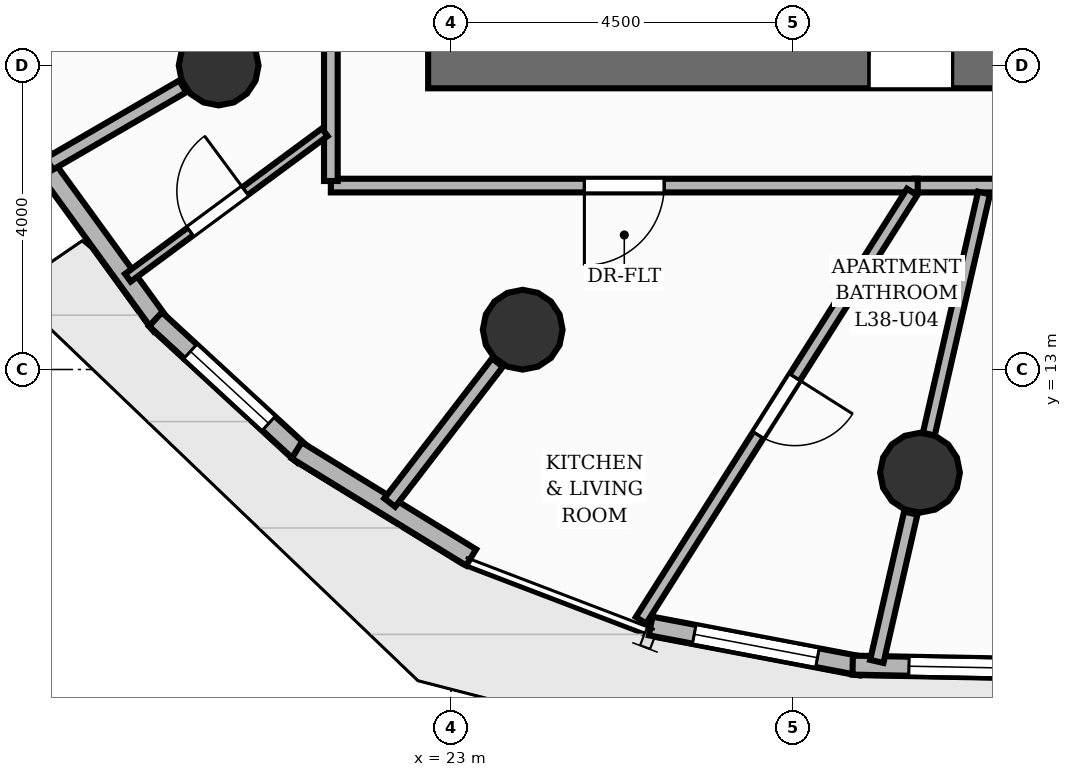
"""IFC4 building model, lengths in metres.
Left out: names, types, materials, properties, quantities, classifications, styles, units other than length and angle.
Written with IfcOpenShell. Run it as: python <this file> out.ifc"""

import sys

from ifc_helpers import new_model, si_unit, direction, frame, frame_2d, origin, origin_2d, place, context, subcontext, project, spatial, rectangle, circle, extrude, element, fill, save


model = new_model("IFC4")
c1 = context("Model", 3, precision=1e-05, world=origin(), true_north=direction((0.0, 1.0)))
c2 = subcontext(c1, "Body", "Model", "MODEL_VIEW")
j1 = project(units=[si_unit("LENGTHUNIT", "METRE"), si_unit("PLANEANGLEUNIT", "RADIAN")], contexts=[c1])
p1 = place(None, origin())
s1 = spatial("IfcSite", under=j1, at=p1, CompositionType="ELEMENT")
p2 = place(p1, origin())
s2 = spatial("IfcBuilding", under=s1, at=p2, CompositionType="ELEMENT")
p3 = place(p2, frame((0.0, 0.0, 129.76)))
s3 = spatial("IfcBuildingStorey", under=s2, at=p3, CompositionType="ELEMENT", Elevation=129.76)
p4 = place(p3, frame((22.7, 17.0, 0.0), z_axis=(0.0, 0.0, 1.0), x_axis=(1.0, 0.0, 0.0)))
e1 = element("IfcWall", 1, at=p4, inside=s3, PredefinedType="SHEAR", context=c2, shape_type="SweptSolid", body=[
    extrude(rectangle(XDim=15.1, YDim=0.6, at=frame_2d((7.55, 0.0))), origin(), (0.0, 0.0, 1.0), 3.2),
])
p5 = place(p4, frame((5.8, 0.0, 0.0)))
e2 = element("IfcOpeningElement", 2, at=p5, cuts=e1, PredefinedType="OPENING", context=c2, shape_type="SweptSolid", body=[
    extrude(rectangle(XDim=1.1, YDim=2.15, at=frame_2d((0.55, 1.075))), frame((0.0, 0.31, 0.0), z_axis=(0.0, -1.0, 0.0), x_axis=(1.0, 0.0, 0.0)), (0.0, 0.0, 1.0), 0.62),
])
p6 = place(p4, frame((9.35, 0.0, 0.0)))
e3 = element("IfcOpeningElement", 3, at=p6, cuts=e1, PredefinedType="OPENING", context=c2, shape_type="SweptSolid", body=[
    extrude(rectangle(XDim=0.9, YDim=2.1, at=frame_2d((0.45, 1.05))), frame((0.0, 0.31, 0.0), z_axis=(0.0, -1.0, 0.0), x_axis=(1.0, 0.0, 0.0)), (0.0, 0.0, 1.0), 0.62),
])
for number, where, z_axis, x_axis in (
    (4, (19.944, 17.0, 0.0), (0.0, 0.0, 1.0), (1.0, 0.0, 0.0)),
    (5, (23.944, 13.523, 0.0), (0.0, 0.0, 1.0), (1.0, 0.0, 0.0)),
    (6, (29.171, 11.642, 0.0), (0.0, 0.0, 1.0), (1.0, 0.0, 0.0)),
):
    element("IfcColumn", number, at=place(p3, frame(where, z_axis=z_axis, x_axis=x_axis)), inside=s3, PredefinedType="COLUMN", context=c2, shape_type="SweptSolid", body=[
        extrude(circle(Radius=0.525, at=origin_2d()), origin(), (0.0, 0.0, 1.0), 3.2),
    ])
p7 = place(p3, frame((17.705, 15.6, 0.0), z_axis=(0.0, 0.0, 1.0), x_axis=(-0.41458087789, 0.910012470073, 0.0)))
e7 = element("IfcWall", 7, at=p7, inside=s3, PredefinedType="SOLIDWALL", context=c2, shape_type="SweptSolid", body=[
    extrude(rectangle(XDim=2.624, YDim=0.25, at=frame_2d((1.312, 0.0))), origin(), (0.0, 0.0, 1.0), 2.96),
])
p8 = place(p7, frame((0.612, 0.0, 0.85)))
e8 = element("IfcOpeningElement", 8, at=p8, cuts=e7, PredefinedType="OPENING", context=c2, shape_type="SweptSolid", body=[
    extrude(rectangle(XDim=1.4, YDim=1.55, at=frame_2d((0.7, 0.775))), frame((0.0, 0.135, 0.0), z_axis=(0.0, -1.0, 0.0), x_axis=(1.0, 0.0, 0.0)), (0.0, 0.0, 1.0), 0.27),
])
p9 = place(p3, frame((19.189, 13.576, 0.0), z_axis=(0.0, 0.0, 1.0), x_axis=(-0.587574137145, 0.80917033643, 0.0)))
e9 = element("IfcWall", 9, at=p9, inside=s3, PredefinedType="SOLIDWALL", context=c2, shape_type="SweptSolid", body=[
    extrude(rectangle(XDim=2.624, YDim=0.25, at=frame_2d((1.312, 0.0))), origin(), (0.0, 0.0, 1.0), 2.96),
])
p10 = place(p3, frame((21.061, 11.868, 0.0), z_axis=(0.0, 0.0, 1.0), x_axis=(-0.73572884951, 0.677276206579, 0.0)))
e10 = element("IfcWall", 10, at=p10, inside=s3, PredefinedType="SOLIDWALL", context=c2, shape_type="SweptSolid", body=[
    extrude(rectangle(XDim=2.648, YDim=0.25, at=frame_2d((1.324, 0.0))), origin(), (0.0, 0.0, 1.0), 2.96),
])
p11 = place(p10, frame((0.624, 0.0, 0.85)))
e11 = element("IfcOpeningElement", 11, at=p11, cuts=e10, PredefinedType="OPENING", context=c2, shape_type="SweptSolid", body=[
    extrude(rectangle(XDim=1.4, YDim=1.55, at=frame_2d((0.7, 0.775))), frame((0.0, 0.135, 0.0), z_axis=(0.0, -1.0, 0.0), x_axis=(1.0, 0.0, 0.0)), (0.0, 0.0, 1.0), 0.27),
])
p12 = place(p3, frame((23.265, 10.527, 0.0), z_axis=(0.0, 0.0, 1.0), x_axis=(-0.852103133134, 0.523373910797, 0.0)))
e12 = element("IfcWall", 12, at=p12, inside=s3, PredefinedType="SOLIDWALL", context=c2, shape_type="SweptSolid", body=[
    extrude(rectangle(XDim=2.693, YDim=0.25, at=frame_2d((1.346, 0.0))), origin(), (0.0, 0.0, 1.0), 2.96),
])
p13 = place(p3, frame((28.396, 9.099, 0.0), z_axis=(0.0, 0.0, 1.0), x_axis=(-0.982412055756, 0.18672587583, 0.0)))
e13 = element("IfcWall", 13, at=p13, inside=s3, PredefinedType="SOLIDWALL", context=c2, shape_type="SweptSolid", body=[
    extrude(rectangle(XDim=2.818, YDim=0.25, at=frame_2d((1.409, 0.0))), origin(), (0.0, 0.0, 1.0), 2.96),
])
p14 = place(p13, frame((0.584, 0.0, 0.85)))
e14 = element("IfcOpeningElement", 14, at=p14, cuts=e13, PredefinedType="OPENING", context=c2, shape_type="SweptSolid", body=[
    extrude(rectangle(XDim=1.65, YDim=1.55, at=frame_2d((0.825, 0.775))), frame((0.0, 0.135, 0.0), z_axis=(0.0, -1.0, 0.0), x_axis=(1.0, 0.0, 0.0)), (0.0, 0.0, 1.0), 0.27),
])
p15 = place(p3, frame((31.167, 9.055, 0.0), z_axis=(0.0, 0.0, 1.0), x_axis=(-0.99981990109, 0.018978023714, 0.0)))
e15 = element("IfcWall", 15, at=p15, inside=s3, PredefinedType="SOLIDWALL", context=c2, shape_type="SweptSolid", body=[
    extrude(rectangle(XDim=2.882, YDim=0.25, at=frame_2d((1.441, 0.0))), origin(), (0.0, 0.0, 1.0), 2.96),
])
p16 = place(p15, frame((0.741, 0.0, 0.85)))
e16 = element("IfcOpeningElement", 16, at=p16, cuts=e15, PredefinedType="OPENING", context=c2, shape_type="SweptSolid", body=[
    extrude(rectangle(XDim=1.4, YDim=1.55, at=frame_2d((0.7, 0.775))), frame((0.0, 0.135, 0.0), z_axis=(0.0, -1.0, 0.0), x_axis=(1.0, 0.0, 0.0)), (0.0, 0.0, 1.0), 0.27),
])
p17 = place(p3, frame((19.472, 16.726, 0.0), z_axis=(0.0, 0.0, 1.0), x_axis=(-0.86481084581, -0.502097800203, 0.0)))
e17 = element("IfcWall", 17, at=p17, inside=s3, PredefinedType="PARTITIONING", context=c2, shape_type="SweptSolid", body=[
    extrude(rectangle(XDim=2.03, YDim=0.18, at=frame_2d((1.015, 0.0))), origin(), (0.0, 0.0, 1.0), 2.336),
])
p18 = place(p3, frame((23.612, 13.092, 0.0), z_axis=(0.0, 0.0, 1.0), x_axis=(-0.609553382458, -0.792745024541, 0.0)))
e18 = element("IfcWall", 18, at=p18, inside=s3, PredefinedType="PARTITIONING", context=c2, shape_type="SweptSolid", body=[
    extrude(rectangle(XDim=2.324, YDim=0.18, at=frame_2d((1.162, 0.0))), origin(), (0.0, 0.0, 1.0), 2.336),
])
p19 = place(p3, frame((29.05, 11.111, 0.0), z_axis=(0.0, 0.0, 1.0), x_axis=(-0.2231492674, -0.974784286116, 0.0)))
e19 = element("IfcWall", 19, at=p19, inside=s3, PredefinedType="PARTITIONING", context=c2, shape_type="SweptSolid", body=[
    extrude(rectangle(XDim=2.002, YDim=0.18, at=frame_2d((1.001, 0.0))), origin(), (0.0, 0.0, 1.0), 2.336),
])
p20 = place(p3, frame((39.02, 15.42, 0.0), z_axis=(0.0, 0.0, 1.0), x_axis=(-1.0, 0.0, 0.0)))
e20 = element("IfcWall", 20, at=p20, inside=s3, PredefinedType="PARTITIONING", context=c2, shape_type="SweptSolid", body=[
    extrude(rectangle(XDim=9.922, YDim=0.18, at=frame_2d((4.961, 0.0))), origin(), (0.0, 0.0, 1.0), 2.955),
])
p21 = place(p20, frame((3.487, 0.0, 0.0)))
e21 = element("IfcOpeningElement", 21, at=p21, cuts=e20, PredefinedType="OPENING", context=c2, shape_type="SweptSolid", body=[
    extrude(rectangle(XDim=0.9, YDim=2.1, at=frame_2d((0.45, 1.05))), frame((0.0, 0.1, 0.0), z_axis=(0.0, -1.0, 0.0), x_axis=(1.0, 0.0, 0.0)), (0.0, 0.0, 1.0), 0.2),
])
p22 = place(p20, frame((6.571, 0.0, 0.0)))
e22 = element("IfcOpeningElement", 22, at=p22, cuts=e20, PredefinedType="OPENING", context=c2, shape_type="SweptSolid", body=[
    extrude(rectangle(XDim=0.9, YDim=2.1, at=frame_2d((0.45, 1.05))), frame((0.0, 0.1, 0.0), z_axis=(0.0, -1.0, 0.0), x_axis=(1.0, 0.0, 0.0)), (0.0, 0.0, 1.0), 0.2),
])
p23 = place(p3, frame((29.141, 15.42, 0.0), z_axis=(0.0, 0.0, 1.0), x_axis=(-1.0, 0.0, 0.0)))
e23 = element("IfcWall", 23, at=p23, inside=s3, PredefinedType="PARTITIONING", context=c2, shape_type="SweptSolid", body=[
    extrude(rectangle(XDim=7.721, YDim=0.18, at=frame_2d((3.861, 0.0))), origin(), (0.0, 0.0, 1.0), 2.955),
])
p24 = place(p23, frame((3.336, 0.0, 0.0)))
e24 = element("IfcOpeningElement", 24, at=p24, cuts=e23, PredefinedType="OPENING", context=c2, shape_type="SweptSolid", body=[
    extrude(rectangle(XDim=1.05, YDim=2.15, at=frame_2d((0.525, 1.075))), frame((0.0, 0.1, 0.0), z_axis=(0.0, -1.0, 0.0), x_axis=(1.0, 0.0, 0.0)), (0.0, 0.0, 1.0), 0.2),
])
p25 = place(p3, frame((21.42, 15.48, 0.0), z_axis=(0.0, 0.0, 1.0), x_axis=(0.0, 1.0, 0.0)))
e25 = element("IfcWall", 25, at=p25, inside=s3, PredefinedType="PARTITIONING", context=c2, shape_type="SweptSolid", body=[
    extrude(rectangle(XDim=6.12, YDim=0.18, at=frame_2d((3.06, 0.0))), origin(), (0.0, 0.0, 1.0), 2.955),
])
p26 = place(p3, frame((29.287, 12.149, 0.0), z_axis=(0.0, 0.0, 1.0), x_axis=(0.223166862669, 0.97478025801, 0.0)))
e26 = element("IfcWall", 26, at=p26, inside=s3, PredefinedType="PLUMBINGWALL", context=c2, shape_type="SweptSolid", body=[
    extrude(rectangle(XDim=3.256, YDim=0.16, at=frame_2d((1.628, 0.0))), origin(), (0.0, 0.0, 1.0), 2.336),
])
p27 = place(p3, frame((29.068, 15.335, 0.0), z_axis=(0.0, 0.0, 1.0), x_axis=(-0.534879638081, -0.844928264864, 0.0)))
e27 = element("IfcWall", 27, at=p27, inside=s3, PredefinedType="PLUMBINGWALL", context=c2, shape_type="SweptSolid", body=[
    extrude(rectangle(XDim=6.669, YDim=0.16, at=frame_2d((3.335, 0.0))), origin(), (0.0, 0.0, 1.0), 2.692),
])
p28 = place(p27, frame((2.885, 0.0, 0.0)))
e28 = element("IfcOpeningElement", 28, at=p28, cuts=e27, PredefinedType="OPENING", context=c2, shape_type="SweptSolid", body=[
    extrude(rectangle(XDim=0.9, YDim=2.1, at=frame_2d((0.45, 1.05))), frame((0.0, 0.09, 0.0), z_axis=(0.0, -1.0, 0.0), x_axis=(1.0, 0.0, 0.0)), (0.0, 0.0, 1.0), 0.18),
])
p29 = place(p3, frame((18.749, 14.207, 0.0), z_axis=(0.0, 0.0, 1.0), x_axis=(0.804182442208, 0.594382536456, 0.0)))
e29 = element("IfcWall", 29, at=p29, inside=s3, PredefinedType="PARTITIONING", context=c2, shape_type="SweptSolid", body=[
    extrude(rectangle(XDim=3.221, YDim=0.125, at=frame_2d((1.611, 0.0))), origin(), (0.0, 0.0, 1.0), 2.955),
])
p30 = place(p29, frame((1.021, 0.0, 0.0)))
e30 = element("IfcOpeningElement", 30, at=p30, cuts=e29, PredefinedType="OPENING", context=c2, shape_type="SweptSolid", body=[
    extrude(rectangle(XDim=0.9, YDim=2.1, at=frame_2d((0.45, 1.05))), frame((0.0, 0.073, 0.0), z_axis=(0.0, -1.0, 0.0), x_axis=(1.0, 0.0, 0.0)), (0.0, 0.0, 1.0), 0.145),
])
p31 = place(p11, origin())
e31 = element("IfcWindow", 31, at=p31, inside=s3, PartitioningType="SINGLE_PANEL", PredefinedType="WINDOW", context=c2, shape_type="SweptSolid", body=[
    extrude(rectangle(XDim=1.4, YDim=1.55, at=frame_2d((0.7, 0.775))), frame((0.0, 0.03, 0.0), z_axis=(0.0, -1.0, 0.0), x_axis=(1.0, 0.0, 0.0)), (0.0, 0.0, 1.0), 0.06),
])
fill(e11, e31)
p32 = place(p14, origin())
e32 = element("IfcWindow", 32, at=p32, inside=s3, PartitioningType="SINGLE_PANEL", PredefinedType="WINDOW", context=c2, shape_type="SweptSolid", body=[
    extrude(rectangle(XDim=1.65, YDim=1.55, at=frame_2d((0.825, 0.775))), frame((0.0, 0.03, 0.0), z_axis=(0.0, -1.0, 0.0), x_axis=(1.0, 0.0, 0.0)), (0.0, 0.0, 1.0), 0.06),
])
fill(e14, e32)
p33 = place(p16, origin())
e33 = element("IfcWindow", 33, at=p33, inside=s3, PartitioningType="SINGLE_PANEL", PredefinedType="WINDOW", context=c2, shape_type="SweptSolid", body=[
    extrude(rectangle(XDim=1.4, YDim=1.55, at=frame_2d((0.7, 0.775))), frame((0.0, 0.03, 0.0), z_axis=(0.0, -1.0, 0.0), x_axis=(1.0, 0.0, 0.0)), (0.0, 0.0, 1.0), 0.06),
])
fill(e16, e33)
p34 = place(p5, origin())
e34 = element("IfcDoor", 34, at=p34, inside=s3, OperationType="SINGLE_SWING_RIGHT", PredefinedType="DOOR", context=c2, shape_type="SweptSolid", body=[
    extrude(rectangle(XDim=1.1, YDim=2.15, at=frame_2d((0.55, 1.075))), frame((0.0, 0.025, 0.0), z_axis=(0.0, -1.0, 0.0), x_axis=(1.0, 0.0, 0.0)), (0.0, 0.0, 1.0), 0.05),
])
fill(e2, e34)
p35 = place(p24, origin())
e35 = element("IfcDoor", 35, at=p35, inside=s3, OperationType="SINGLE_SWING_RIGHT", PredefinedType="DOOR", context=c2, shape_type="SweptSolid", body=[
    extrude(rectangle(XDim=1.05, YDim=2.15, at=frame_2d((0.525, 1.075))), frame((0.0, 0.025, 0.0), z_axis=(0.0, -1.0, 0.0), x_axis=(1.0, 0.0, 0.0)), (0.0, 0.0, 1.0), 0.05),
])
fill(e24, e35)
p36 = place(p28, origin())
e36 = element("IfcDoor", 36, at=p36, inside=s3, OperationType="SINGLE_SWING_LEFT", PredefinedType="DOOR", context=c2, shape_type="SweptSolid", body=[
    extrude(rectangle(XDim=0.9, YDim=2.1, at=frame_2d((0.45, 1.05))), frame((0.0, 0.025, 0.0), z_axis=(0.0, -1.0, 0.0), x_axis=(1.0, 0.0, 0.0)), (0.0, 0.0, 1.0), 0.05),
])
fill(e28, e36)
p37 = place(p30, origin())
e37 = element("IfcDoor", 37, at=p37, inside=s3, OperationType="SINGLE_SWING_RIGHT", PredefinedType="DOOR", context=c2, shape_type="SweptSolid", body=[
    extrude(rectangle(XDim=0.9, YDim=2.1, at=frame_2d((0.45, 1.05))), frame((0.0, 0.025, 0.0), z_axis=(0.0, -1.0, 0.0), x_axis=(1.0, 0.0, 0.0)), (0.0, 0.0, 1.0), 0.05),
])
fill(e30, e37)
save(model, sys.argv[1])
